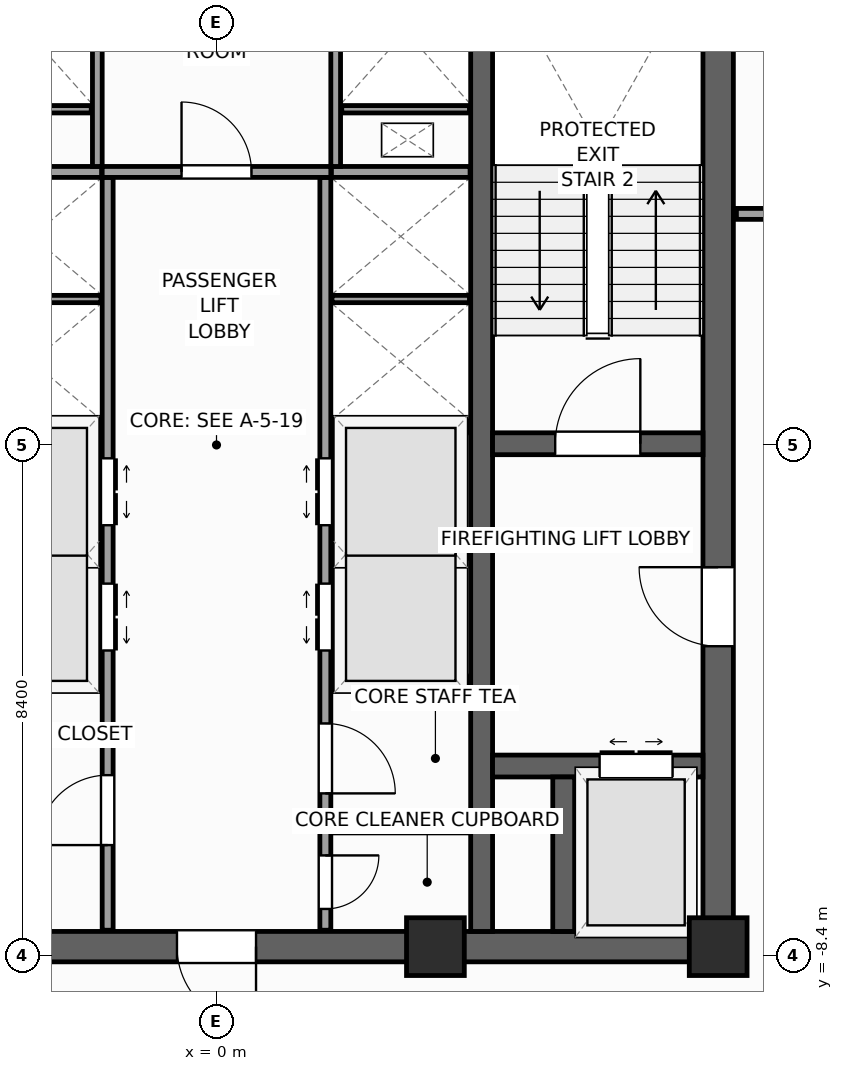
"""IFC4 building model, lengths in metres.
Left out: names, types, materials, properties, quantities, classifications, styles, units other than length and angle.
Written with IfcOpenShell. Run it as: python <this file> out.ifc"""

import sys

from ifc_helpers import new_model, si_unit, direction, frame, frame_2d, origin, origin_2d, place, context, subcontext, project, spatial, rectangle, extrude, source, transform, mapped, element, fill, save


model = new_model("IFC4")
c1 = context("Model", 3, precision=1e-05, world=origin(), true_north=direction((0.0, 1.0)))
c2 = subcontext(c1, "Body", "Model", "MODEL_VIEW")
j1 = project(units=[si_unit("LENGTHUNIT", "METRE"), si_unit("PLANEANGLEUNIT", "RADIAN")], contexts=[c1])
p1 = place(None, origin())
s1 = spatial("IfcSite", under=j1, at=p1, CompositionType="ELEMENT")
p2 = place(p1, origin())
s2 = spatial("IfcBuilding", under=s1, at=p2, CompositionType="ELEMENT")
p3 = place(p2, frame((0.0, 0.0, 229.0)))
s3 = spatial("IfcBuildingStorey", under=s2, at=p3, CompositionType="ELEMENT", Elevation=229.0)
p4 = place(p3, frame((-8.5, -8.25, 0.0), z_axis=(0.0, 0.0, 1.0), x_axis=(1.0, 0.0, 0.0)))
e1 = element("IfcWall", 1, at=p4, inside=s3, PredefinedType="SHEAR", context=c2, shape_type="SweptSolid", body=[
    extrude(rectangle(XDim=17.0, YDim=0.5, at=frame_2d((8.5, 0.0))), origin(), (0.0, 0.0, 1.0), 3.9),
])
p5 = place(p4, frame((7.85, 0.0, 0.0)))
e2 = element("IfcOpeningElement", 2, at=p5, cuts=e1, PredefinedType="OPENING", context=c2, shape_type="SweptSolid", body=[
    extrude(rectangle(XDim=1.3, YDim=2.2, at=frame_2d((0.65, 1.1))), frame((0.0, 0.26, 0.0), z_axis=(0.0, -1.0, 0.0), x_axis=(1.0, 0.0, 0.0)), (0.0, 0.0, 1.0), 0.52),
])
p6 = place(p3, frame((8.25, -8.0, 0.0), z_axis=(0.0, 0.0, 1.0), x_axis=(0.0, 1.0, 0.0)))
e3 = element("IfcWall", 3, at=p6, inside=s3, PredefinedType="SHEAR", context=c2, shape_type="SweptSolid", body=[
    extrude(rectangle(XDim=16.0, YDim=0.5, at=frame_2d((8.0, 0.0))), origin(), (0.0, 0.0, 1.0), 3.9),
])
p7 = place(p6, frame((4.69, 0.0, 0.0)))
e4 = element("IfcOpeningElement", 4, at=p7, cuts=e3, PredefinedType="OPENING", context=c2, shape_type="SweptSolid", body=[
    extrude(rectangle(XDim=1.3, YDim=2.2, at=frame_2d((0.65, 1.1))), frame((0.0, 0.26, 0.0), z_axis=(0.0, -1.0, 0.0), x_axis=(1.0, 0.0, 0.0)), (0.0, 0.0, 1.0), 0.52),
])
p8 = place(p3, frame((4.36, -8.0, 0.0), z_axis=(0.0, 0.0, 1.0), x_axis=(0.0, 1.0, 0.0)))
e5 = element("IfcWall", 5, at=p8, inside=s3, PredefinedType="SHEAR", context=c2, shape_type="SweptSolid", body=[
    extrude(rectangle(XDim=16.0, YDim=0.36, at=frame_2d((8.0, 0.0))), origin(), (0.0, 0.0, 1.0), 3.9),
])
p9 = place(p3, frame((4.54, 0.02, 0.0), z_axis=(0.0, 0.0, 1.0), x_axis=(1.0, 0.0, 0.0)))
e6 = element("IfcWall", 6, at=p9, inside=s3, PredefinedType="SHEAR", context=c2, shape_type="SweptSolid", body=[
    extrude(rectangle(XDim=3.46, YDim=0.36, at=frame_2d((1.73, 0.0))), origin(), (0.0, 0.0, 1.0), 3.9),
])
p10 = place(p9, frame((1.03, 0.0, 0.0)))
e7 = element("IfcOpeningElement", 7, at=p10, cuts=e6, PredefinedType="OPENING", context=c2, shape_type="SweptSolid", body=[
    extrude(rectangle(XDim=1.4, YDim=2.2, at=frame_2d((0.7, 1.1))), frame((0.0, 0.19, 0.0), z_axis=(0.0, -1.0, 0.0), x_axis=(1.0, 0.0, 0.0)), (0.0, 0.0, 1.0), 0.38),
])
p11 = place(p3, frame((4.54, -5.28, 0.0), z_axis=(0.0, 0.0, 1.0), x_axis=(1.0, 0.0, 0.0)))
e8 = element("IfcWall", 8, at=p11, inside=s3, PredefinedType="SHEAR", context=c2, shape_type="SweptSolid", body=[
    extrude(rectangle(XDim=3.46, YDim=0.36, at=frame_2d((1.73, 0.0))), origin(), (0.0, 0.0, 1.0), 3.9),
])
p12 = place(p11, frame((1.76, 0.0, 0.0)))
e9 = element("IfcOpeningElement", 9, at=p12, cuts=e8, PredefinedType="OPENING", context=c2, shape_type="SweptSolid", body=[
    extrude(rectangle(XDim=1.2, YDim=2.25, at=frame_2d((0.6, 1.125))), frame((0.0, 0.19, 0.0), z_axis=(0.0, -1.0, 0.0), x_axis=(1.0, 0.0, 0.0)), (0.0, 0.0, 1.0), 0.38),
])
p13 = place(p3, frame((5.71, -8.0, 0.0), z_axis=(0.0, 0.0, 1.0), x_axis=(0.0, 1.0, 0.0)))
e10 = element("IfcWall", 10, at=p13, inside=s3, PredefinedType="SHEAR", context=c2, shape_type="SweptSolid", body=[
    extrude(rectangle(XDim=2.54, YDim=0.36, at=frame_2d((1.27, 0.0))), origin(), (0.0, 0.0, 1.0), 3.9),
])
m1 = source(origin(), c2, "Body", "SweptSolid", [
    extrude(rectangle(XDim=0.95, YDim=0.95, at=origin_2d()), origin(), (0.0, 0.0, 1.0), 3.9),
])
for number, where, z_axis, x_axis in (
    (11, (8.25, -8.25, 0.0), (0.0, 0.0, 1.0), (1.0, 0.0, 0.0)),
    (12, (3.6, -8.25, 0.0), (0.0, 0.0, 1.0), (1.0, 0.0, 0.0)),
):
    element("IfcColumn", number, at=place(p3, frame(where, z_axis=z_axis, x_axis=x_axis)), inside=s3, PredefinedType="PILASTER", context=c2, shape_type="MappedRepresentation", body=[
        mapped(m1, transform((0.0, 0.0, 0.0), scale=1.0)),
    ])
p14 = place(p3, frame((6.733, -29.154, 0.0), z_axis=(0.0, 0.0, 1.0), x_axis=(0.629325378072, 0.77714192302, 0.0)))
e13 = element("IfcWall", 13, at=p14, inside=s3, PredefinedType="STANDARD", context=c2, shape_type="SweptSolid", body=[
    extrude(rectangle(XDim=36.84, YDim=0.34, at=frame_2d((18.42, 0.0))), origin(), (0.0, 0.0, 1.0), 2.96),
])
p15 = place(p14, frame((3.721, 0.0, 0.48)))
e14 = element("IfcOpeningElement", 14, at=p15, cuts=e13, PredefinedType="OPENING", context=c2, shape_type="SweptSolid", body=[
    extrude(rectangle(XDim=1.4, YDim=2.4, at=frame_2d((0.7, 1.2))), frame((0.0, 0.18, 0.0), z_axis=(0.0, -1.0, 0.0), x_axis=(1.0, 0.0, 0.0)), (0.0, 0.0, 1.0), 0.36),
])
p16 = place(p14, frame((9.809, 0.0, 0.58)))
e15 = element("IfcOpeningElement", 15, at=p16, cuts=e13, PredefinedType="OPENING", context=c2, shape_type="SweptSolid", body=[
    extrude(rectangle(XDim=1.75, YDim=2.3, at=frame_2d((0.875, 1.15))), frame((0.0, 0.18, 0.0), z_axis=(0.0, -1.0, 0.0), x_axis=(1.0, 0.0, 0.0)), (0.0, 0.0, 1.0), 0.36),
])
p17 = place(p14, frame((16.058, 0.0, 0.58)))
e16 = element("IfcOpeningElement", 16, at=p17, cuts=e13, PredefinedType="OPENING", context=c2, shape_type="SweptSolid", body=[
    extrude(rectangle(XDim=1.75, YDim=2.3, at=frame_2d((0.875, 1.15))), frame((0.0, 0.18, 0.0), z_axis=(0.0, -1.0, 0.0), x_axis=(1.0, 0.0, 0.0)), (0.0, 0.0, 1.0), 0.36),
])
p18 = place(p14, frame((24.176, 0.0, 0.58)))
e17 = element("IfcOpeningElement", 17, at=p18, cuts=e13, PredefinedType="OPENING", context=c2, shape_type="SweptSolid", body=[
    extrude(rectangle(XDim=1.75, YDim=2.3, at=frame_2d((0.875, 1.15))), frame((0.0, 0.18, 0.0), z_axis=(0.0, -1.0, 0.0), x_axis=(1.0, 0.0, 0.0)), (0.0, 0.0, 1.0), 0.36),
])
p19 = place(p14, frame((30.982, 0.0, 0.48)))
e18 = element("IfcOpeningElement", 18, at=p19, cuts=e13, PredefinedType="OPENING", context=c2, shape_type="SweptSolid", body=[
    extrude(rectangle(XDim=1.4, YDim=2.4, at=frame_2d((0.7, 1.2))), frame((0.0, 0.18, 0.0), z_axis=(0.0, -1.0, 0.0), x_axis=(1.0, 0.0, 0.0)), (0.0, 0.0, 1.0), 0.36),
])
p20 = place(p3, frame((-29.154, -6.733, 0.0), z_axis=(0.0, 0.0, 1.0), x_axis=(0.77714192302, -0.629325378072, 0.0)))
e19 = element("IfcWall", 19, at=p20, inside=s3, PredefinedType="STANDARD", context=c2, shape_type="SweptSolid", body=[
    extrude(rectangle(XDim=36.84, YDim=0.34, at=frame_2d((18.42, 0.0))), origin(), (0.0, 0.0, 1.0), 2.96),
])
p21 = place(p20, frame((23.495, 0.0, 0.0)))
e20 = element("IfcOpeningElement", 20, at=p21, cuts=e19, PredefinedType="OPENING", context=c2, shape_type="SweptSolid", body=[
    extrude(rectangle(XDim=1.05, YDim=2.25, at=frame_2d((0.525, 1.125))), frame((0.0, 0.18, 0.0), z_axis=(0.0, -1.0, 0.0), x_axis=(1.0, 0.0, 0.0)), (0.0, 0.0, 1.0), 0.36),
])
p22 = place(p20, frame((3.721, 0.0, 0.48)))
e21 = element("IfcOpeningElement", 21, at=p22, cuts=e19, PredefinedType="OPENING", context=c2, shape_type="SweptSolid", body=[
    extrude(rectangle(XDim=1.4, YDim=2.4, at=frame_2d((0.7, 1.2))), frame((0.0, 0.18, 0.0), z_axis=(0.0, -1.0, 0.0), x_axis=(1.0, 0.0, 0.0)), (0.0, 0.0, 1.0), 0.36),
])
p23 = place(p20, frame((9.809, 0.0, 0.58)))
e22 = element("IfcOpeningElement", 22, at=p23, cuts=e19, PredefinedType="OPENING", context=c2, shape_type="SweptSolid", body=[
    extrude(rectangle(XDim=1.75, YDim=2.3, at=frame_2d((0.875, 1.15))), frame((0.0, 0.18, 0.0), z_axis=(0.0, -1.0, 0.0), x_axis=(1.0, 0.0, 0.0)), (0.0, 0.0, 1.0), 0.36),
])
p24 = place(p20, frame((16.058, 0.0, 0.58)))
e23 = element("IfcOpeningElement", 23, at=p24, cuts=e19, PredefinedType="OPENING", context=c2, shape_type="SweptSolid", body=[
    extrude(rectangle(XDim=1.75, YDim=2.3, at=frame_2d((0.875, 1.15))), frame((0.0, 0.18, 0.0), z_axis=(0.0, -1.0, 0.0), x_axis=(1.0, 0.0, 0.0)), (0.0, 0.0, 1.0), 0.36),
])
p25 = place(p20, frame((25.676, 0.0, 0.58)))
e24 = element("IfcOpeningElement", 24, at=p25, cuts=e19, PredefinedType="OPENING", context=c2, shape_type="SweptSolid", body=[
    extrude(rectangle(XDim=1.75, YDim=2.3, at=frame_2d((0.875, 1.15))), frame((0.0, 0.18, 0.0), z_axis=(0.0, -1.0, 0.0), x_axis=(1.0, 0.0, 0.0)), (0.0, 0.0, 1.0), 0.36),
])
p26 = place(p20, frame((30.982, 0.0, 0.48)))
e25 = element("IfcOpeningElement", 25, at=p26, cuts=e19, PredefinedType="OPENING", context=c2, shape_type="SweptSolid", body=[
    extrude(rectangle(XDim=1.4, YDim=2.4, at=frame_2d((0.7, 1.2))), frame((0.0, 0.18, 0.0), z_axis=(0.0, -1.0, 0.0), x_axis=(1.0, 0.0, 0.0)), (0.0, 0.0, 1.0), 0.36),
])
p27 = place(p3, frame((-1.79, -7.98, 0.0), z_axis=(0.0, 0.0, 1.0), x_axis=(0.0, 1.0, 0.0)))
e26 = element("IfcWall", 26, at=p27, inside=s3, PredefinedType="PARTITIONING", context=c2, shape_type="SweptSolid", body=[
    extrude(rectangle(XDim=12.38, YDim=0.18, at=frame_2d((6.19, 0.0))), origin(), (0.0, 0.0, 1.0), 3.66),
])
p28 = place(p27, frame((4.6, 0.0, 0.0)))
e27 = element("IfcOpeningElement", 27, at=p28, cuts=e26, PredefinedType="OPENING", context=c2, shape_type="SweptSolid", body=[
    extrude(rectangle(XDim=1.1, YDim=2.2, at=frame_2d((0.55, 1.1))), frame((0.0, 0.1, 0.0), z_axis=(0.0, -1.0, 0.0), x_axis=(1.0, 0.0, 0.0)), (0.0, 0.0, 1.0), 0.2),
])
p29 = place(p27, frame((6.66, 0.0, 0.0)))
e28 = element("IfcOpeningElement", 28, at=p29, cuts=e26, PredefinedType="OPENING", context=c2, shape_type="SweptSolid", body=[
    extrude(rectangle(XDim=1.1, YDim=2.2, at=frame_2d((0.55, 1.1))), frame((0.0, 0.1, 0.0), z_axis=(0.0, -1.0, 0.0), x_axis=(1.0, 0.0, 0.0)), (0.0, 0.0, 1.0), 0.2),
])
p30 = place(p27, frame((1.4, 0.0, 0.0)))
e29 = element("IfcOpeningElement", 29, at=p30, cuts=e26, PredefinedType="OPENING", context=c2, shape_type="SweptSolid", body=[
    extrude(rectangle(XDim=1.15, YDim=2.25, at=frame_2d((0.575, 1.125))), frame((0.0, 0.1, 0.0), z_axis=(0.0, -1.0, 0.0), x_axis=(1.0, 0.0, 0.0)), (0.0, 0.0, 1.0), 0.2),
])
p31 = place(p3, frame((1.79, -7.98, 0.0), z_axis=(0.0, 0.0, 1.0), x_axis=(0.0, 1.0, 0.0)))
e30 = element("IfcWall", 30, at=p31, inside=s3, PredefinedType="PARTITIONING", context=c2, shape_type="SweptSolid", body=[
    extrude(rectangle(XDim=12.38, YDim=0.18, at=frame_2d((6.19, 0.0))), origin(), (0.0, 0.0, 1.0), 3.66),
])
p32 = place(p31, frame((4.6, 0.0, 0.0)))
e31 = element("IfcOpeningElement", 31, at=p32, cuts=e30, PredefinedType="OPENING", context=c2, shape_type="SweptSolid", body=[
    extrude(rectangle(XDim=1.1, YDim=2.2, at=frame_2d((0.55, 1.1))), frame((0.0, 0.1, 0.0), z_axis=(0.0, -1.0, 0.0), x_axis=(1.0, 0.0, 0.0)), (0.0, 0.0, 1.0), 0.2),
])
p33 = place(p31, frame((6.66, 0.0, 0.0)))
e32 = element("IfcOpeningElement", 32, at=p33, cuts=e30, PredefinedType="OPENING", context=c2, shape_type="SweptSolid", body=[
    extrude(rectangle(XDim=1.1, YDim=2.2, at=frame_2d((0.55, 1.1))), frame((0.0, 0.1, 0.0), z_axis=(0.0, -1.0, 0.0), x_axis=(1.0, 0.0, 0.0)), (0.0, 0.0, 1.0), 0.2),
])
p34 = place(p31, frame((0.35, 0.0, 0.0)))
e33 = element("IfcOpeningElement", 33, at=p34, cuts=e30, PredefinedType="OPENING", context=c2, shape_type="SweptSolid", body=[
    extrude(rectangle(XDim=0.88, YDim=2.1, at=frame_2d((0.44, 1.05))), frame((0.0, 0.1, 0.0), z_axis=(0.0, -1.0, 0.0), x_axis=(1.0, 0.0, 0.0)), (0.0, 0.0, 1.0), 0.2),
])
p35 = place(p31, frame((2.25, 0.0, 0.0)))
e34 = element("IfcOpeningElement", 34, at=p35, cuts=e30, PredefinedType="OPENING", context=c2, shape_type="SweptSolid", body=[
    extrude(rectangle(XDim=1.15, YDim=2.25, at=frame_2d((0.575, 1.125))), frame((0.0, 0.1, 0.0), z_axis=(0.0, -1.0, 0.0), x_axis=(1.0, 0.0, 0.0)), (0.0, 0.0, 1.0), 0.2),
])
p36 = place(p3, frame((-1.88, 4.49, 0.0), z_axis=(0.0, 0.0, 1.0), x_axis=(1.0, 0.0, 0.0)))
e35 = element("IfcWall", 35, at=p36, inside=s3, PredefinedType="PARTITIONING", context=c2, shape_type="SweptSolid", body=[
    extrude(rectangle(XDim=3.76, YDim=0.18, at=frame_2d((1.88, 0.0))), origin(), (0.0, 0.0, 1.0), 3.66),
])
p37 = place(p36, frame((1.305, 0.0, 0.0)))
e36 = element("IfcOpeningElement", 36, at=p37, cuts=e35, PredefinedType="OPENING", context=c2, shape_type="SweptSolid", body=[
    extrude(rectangle(XDim=1.15, YDim=2.25, at=frame_2d((0.575, 1.125))), frame((0.0, 0.1, 0.0), z_axis=(0.0, -1.0, 0.0), x_axis=(1.0, 0.0, 0.0)), (0.0, 0.0, 1.0), 0.2),
])
for number, where, z_axis, x_axis in (
    (37, (-4.17, -3.9, 0.0), (0.0, 0.0, 1.0), (1.0, 0.0, 0.0)),
    (38, (1.89, -3.9, 0.0), (0.0, 0.0, 1.0), (1.0, 0.0, 0.0)),
    (39, (-4.17, 0.3, 0.0), (0.0, 0.0, 1.0), (1.0, 0.0, 0.0)),
    (40, (1.89, 0.3, 0.0), (0.0, 0.0, 1.0), (1.0, 0.0, 0.0)),
    (41, (-4.17, 4.49, 0.0), (0.0, 0.0, 1.0), (1.0, 0.0, 0.0)),
    (42, (1.89, 4.49, 0.0), (0.0, 0.0, 1.0), (1.0, 0.0, 0.0)),
):
    element("IfcWall", number, at=place(p3, frame(where, z_axis=z_axis, x_axis=x_axis)), inside=s3, PredefinedType="PARTITIONING", context=c2, shape_type="SweptSolid", body=[
        extrude(rectangle(XDim=2.28, YDim=0.18, at=frame_2d((1.14, 0.0))), origin(), (0.0, 0.0, 1.0), 3.66),
    ])
for number, where, z_axis, x_axis in (
    (43, (-4.16, -1.8, 0.0), (0.0, 0.0, 1.0), (1.0, 0.0, 0.0)),
    (44, (1.9, -1.8, 0.0), (0.0, 0.0, 1.0), (1.0, 0.0, 0.0)),
    (45, (-4.16, 2.4, 0.0), (0.0, 0.0, 1.0), (1.0, 0.0, 0.0)),
    (46, (1.9, 2.4, 0.0), (0.0, 0.0, 1.0), (1.0, 0.0, 0.0)),
):
    element("IfcWall", number, at=place(p3, frame(where, z_axis=z_axis, x_axis=x_axis)), inside=s3, PredefinedType="PARTITIONING", context=c2, shape_type="SweptSolid", body=[
        extrude(rectangle(XDim=2.26, YDim=0.12, at=frame_2d((1.13, 0.0))), origin(), (0.0, 0.0, 1.0), 3.66),
    ])
p38 = place(p3, frame((1.89, -6.3, 0.0), z_axis=(0.0, 0.0, 1.0), x_axis=(1.0, 0.0, 0.0)))
e47 = element("IfcWall", 47, at=p38, inside=s3, PredefinedType="PARTITIONING", context=c2, shape_type="SweptSolid", body=[
    extrude(rectangle(XDim=2.28, YDim=0.16, at=frame_2d((1.14, 0.0))), origin(), (0.0, 0.0, 1.0), 3.66),
])
for number, where, z_axis, x_axis in (
    (48, (-1.96, 4.58, 0.0), (0.0, 0.0, 1.0), (0.0, 1.0, 0.0)),
    (49, (1.96, 4.58, 0.0), (0.0, 0.0, 1.0), (0.0, 1.0, 0.0)),
):
    element("IfcWall", number, at=place(p3, frame(where, z_axis=z_axis, x_axis=x_axis)), inside=s3, PredefinedType="PARTITIONING", context=c2, shape_type="SweptSolid", body=[
        extrude(rectangle(XDim=3.4, YDim=0.16, at=frame_2d((1.7, 0.0))), origin(), (0.0, 0.0, 1.0), 3.66),
    ])
for number, where, z_axis, x_axis in (
    (50, (-4.16, 5.52, 0.0), (0.0, 0.0, 1.0), (1.0, 0.0, 0.0)),
    (51, (2.06, 5.52, 0.0), (0.0, 0.0, 1.0), (1.0, 0.0, 0.0)),
):
    element("IfcWall", number, at=place(p3, frame(where, z_axis=z_axis, x_axis=x_axis)), inside=s3, PredefinedType="PARTITIONING", context=c2, shape_type="SweptSolid", body=[
        extrude(rectangle(XDim=2.1, YDim=0.12, at=frame_2d((1.05, 0.0))), origin(), (0.0, 0.0, 1.0), 3.66),
    ])
p39 = place(p3, frame((8.55, 3.8, 0.0), z_axis=(0.0, 0.0, 1.0), x_axis=(1.0, 0.0, 0.0)))
e52 = element("IfcWall", 52, at=p39, inside=s3, PredefinedType="PARTITIONING", context=c2, shape_type="SweptSolid", body=[
    extrude(rectangle(XDim=3.9, YDim=0.18, at=frame_2d((1.95, 0.0))), origin(), (0.0, 0.0, 1.0), 3.66),
])
p40 = place(p39, frame((1.4, 0.0, 0.0)))
e53 = element("IfcOpeningElement", 53, at=p40, cuts=e52, PredefinedType="OPENING", context=c2, shape_type="SweptSolid", body=[
    extrude(rectangle(XDim=1.1, YDim=2.2, at=frame_2d((0.55, 1.1))), frame((0.0, 0.1, 0.0), z_axis=(0.0, -1.0, 0.0), x_axis=(1.0, 0.0, 0.0)), (0.0, 0.0, 1.0), 0.2),
])
m2 = source(origin(), c2, "Body", "SweptSolid", [
    extrude(rectangle(XDim=1.4, YDim=2.2, at=frame_2d((0.7, 1.1))), frame((0.0, 0.025, 0.0), z_axis=(0.0, -1.0, 0.0), x_axis=(1.0, 0.0, 0.0)), (0.0, 0.0, 1.0), 0.05),
])
p41 = place(p10, origin())
e54 = element("IfcDoor", 54, at=p41, inside=s3, OperationType="SINGLE_SWING_RIGHT", PredefinedType="DOOR", context=c2, shape_type="MappedRepresentation", body=[
    mapped(m2, transform((0.0, 0.0, 0.0), scale=1.0)),
])
fill(e7, e54)
m3 = source(origin(), c2, "Body", "SweptSolid", [
    extrude(rectangle(XDim=1.3, YDim=2.2, at=frame_2d((0.65, 1.1))), frame((0.0, 0.025, 0.0), z_axis=(0.0, -1.0, 0.0), x_axis=(1.0, 0.0, 0.0)), (0.0, 0.0, 1.0), 0.05),
])
p42 = place(p7, origin())
e55 = element("IfcDoor", 55, at=p42, inside=s3, OperationType="SINGLE_SWING_RIGHT", PredefinedType="DOOR", context=c2, shape_type="MappedRepresentation", body=[
    mapped(m3, transform((0.0, 0.0, 0.0), scale=1.0)),
])
fill(e4, e55)
p43 = place(p5, frame((1.3, 0.0, 0.0), z_axis=(0.0, 0.0, 1.0), x_axis=(-1.0, 0.0, 0.0)))
e56 = element("IfcDoor", 56, at=p43, inside=s3, OperationType="SINGLE_SWING_RIGHT", PredefinedType="DOOR", context=c2, shape_type="MappedRepresentation", body=[
    mapped(m3, transform((0.0, 0.0, 0.0), scale=1.0)),
])
fill(e2, e56)
m4 = source(origin(), c2, "Body", "SweptSolid", [
    extrude(rectangle(XDim=1.2, YDim=2.25, at=frame_2d((0.6, 1.125))), frame((0.0, 0.025, 0.0), z_axis=(0.0, -1.0, 0.0), x_axis=(1.0, 0.0, 0.0)), (0.0, 0.0, 1.0), 0.05),
])
p44 = place(p12, origin())
e57 = element("IfcDoor", 57, at=p44, inside=s3, OperationType="DOUBLE_DOOR_SLIDING", PredefinedType="DOOR", context=c2, shape_type="MappedRepresentation", body=[
    mapped(m4, transform((0.0, 0.0, 0.0), scale=1.0)),
])
fill(e9, e57)
m5 = source(origin(), c2, "Body", "SweptSolid", [
    extrude(rectangle(XDim=1.1, YDim=2.2, at=frame_2d((0.55, 1.1))), frame((0.0, 0.025, 0.0), z_axis=(0.0, -1.0, 0.0), x_axis=(1.0, 0.0, 0.0)), (0.0, 0.0, 1.0), 0.05),
])
p45 = place(p28, frame((1.1, 0.0, 0.0), z_axis=(0.0, 0.0, 1.0), x_axis=(-1.0, 0.0, 0.0)))
e58 = element("IfcDoor", 58, at=p45, inside=s3, OperationType="DOUBLE_DOOR_SLIDING", PredefinedType="DOOR", context=c2, shape_type="MappedRepresentation", body=[
    mapped(m5, transform((0.0, 0.0, 0.0), scale=1.0)),
])
fill(e27, e58)
p46 = place(p29, frame((1.1, 0.0, 0.0), z_axis=(0.0, 0.0, 1.0), x_axis=(-1.0, 0.0, 0.0)))
e59 = element("IfcDoor", 59, at=p46, inside=s3, OperationType="DOUBLE_DOOR_SLIDING", PredefinedType="DOOR", context=c2, shape_type="MappedRepresentation", body=[
    mapped(m5, transform((0.0, 0.0, 0.0), scale=1.0)),
])
fill(e28, e59)
p47 = place(p32, origin())
e60 = element("IfcDoor", 60, at=p47, inside=s3, OperationType="DOUBLE_DOOR_SLIDING", PredefinedType="DOOR", context=c2, shape_type="MappedRepresentation", body=[
    mapped(m5, transform((0.0, 0.0, 0.0), scale=1.0)),
])
fill(e31, e60)
p48 = place(p33, origin())
e61 = element("IfcDoor", 61, at=p48, inside=s3, OperationType="DOUBLE_DOOR_SLIDING", PredefinedType="DOOR", context=c2, shape_type="MappedRepresentation", body=[
    mapped(m5, transform((0.0, 0.0, 0.0), scale=1.0)),
])
fill(e32, e61)
m6 = source(origin(), c2, "Body", "SweptSolid", [
    extrude(rectangle(XDim=1.15, YDim=2.25, at=frame_2d((0.575, 1.125))), frame((0.0, 0.025, 0.0), z_axis=(0.0, -1.0, 0.0), x_axis=(1.0, 0.0, 0.0)), (0.0, 0.0, 1.0), 0.05),
])
p49 = place(p30, origin())
e62 = element("IfcDoor", 62, at=p49, inside=s3, OperationType="SINGLE_SWING_LEFT", PredefinedType="DOOR", context=c2, shape_type="MappedRepresentation", body=[
    mapped(m6, transform((0.0, 0.0, 0.0), scale=1.0)),
])
fill(e29, e62)
m7 = source(origin(), c2, "Body", "SweptSolid", [
    extrude(rectangle(XDim=0.88, YDim=2.1, at=frame_2d((0.44, 1.05))), frame((0.0, 0.025, 0.0), z_axis=(0.0, -1.0, 0.0), x_axis=(1.0, 0.0, 0.0)), (0.0, 0.0, 1.0), 0.05),
])
p50 = place(p34, frame((0.88, 0.0, 0.0), z_axis=(0.0, 0.0, 1.0), x_axis=(-1.0, 0.0, 0.0)))
e63 = element("IfcDoor", 63, at=p50, inside=s3, OperationType="SINGLE_SWING_RIGHT", PredefinedType="DOOR", context=c2, shape_type="MappedRepresentation", body=[
    mapped(m7, transform((0.0, 0.0, 0.0), scale=1.0)),
])
fill(e33, e63)
p51 = place(p35, frame((1.15, 0.0, 0.0), z_axis=(0.0, 0.0, 1.0), x_axis=(-1.0, 0.0, 0.0)))
e64 = element("IfcDoor", 64, at=p51, inside=s3, OperationType="SINGLE_SWING_LEFT", PredefinedType="DOOR", context=c2, shape_type="MappedRepresentation", body=[
    mapped(m6, transform((0.0, 0.0, 0.0), scale=1.0)),
])
fill(e34, e64)
p52 = place(p37, origin())
e65 = element("IfcDoor", 65, at=p52, inside=s3, OperationType="SINGLE_SWING_LEFT", PredefinedType="DOOR", context=c2, shape_type="MappedRepresentation", body=[
    mapped(m6, transform((0.0, 0.0, 0.0), scale=1.0)),
])
fill(e36, e65)
save(model, sys.argv[1])
